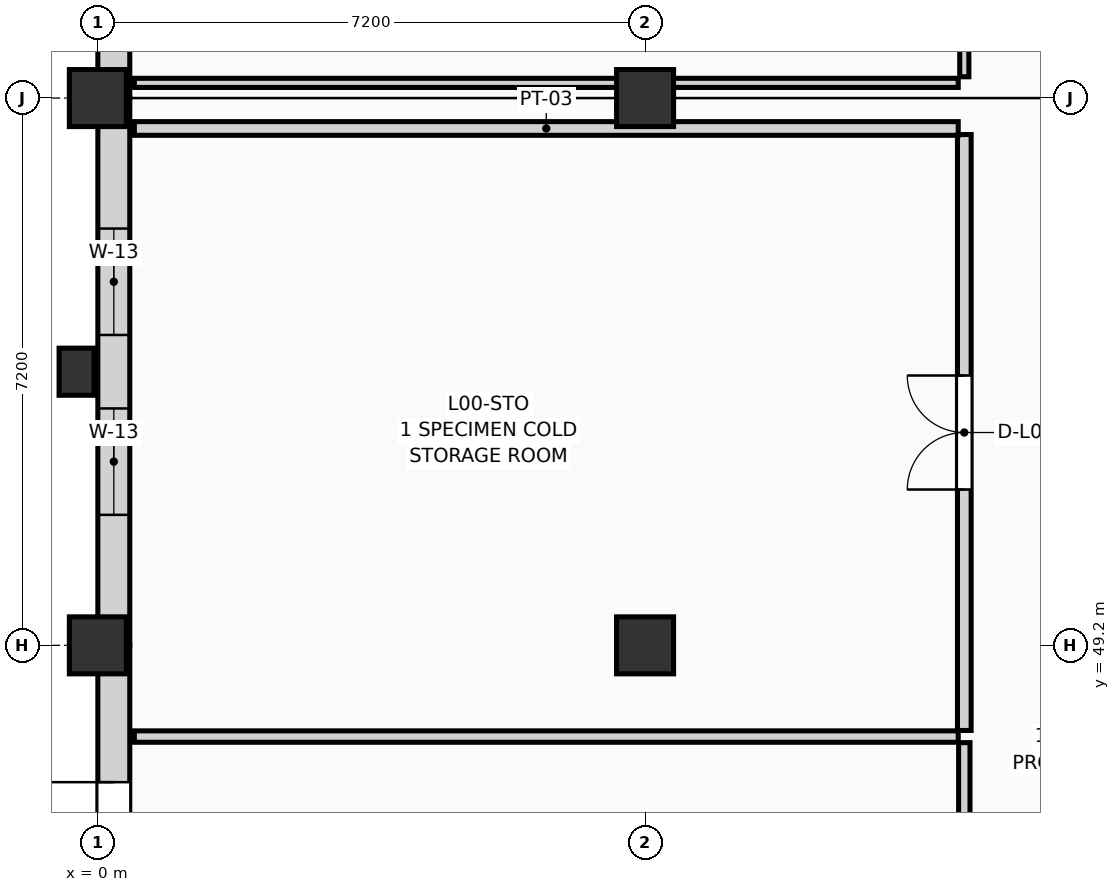
"""IFC4 building model, lengths in metres.
Left out: names, types, materials, properties, quantities, classifications, styles, units other than length and angle.
Written with IfcOpenShell. Run it as: python <this file> out.ifc"""

import sys

from ifc_helpers import new_model, si_unit, direction, frame, frame_2d, origin, origin_2d, place, context, subcontext, project, spatial, rectangle, extrude, element, fill, save


model = new_model("IFC4")
c1 = context("Model", 3, precision=1e-05, world=origin(), true_north=direction((0.0, 1.0)))
c2 = subcontext(c1, "Body", "Model", "MODEL_VIEW")
j1 = project(units=[si_unit("LENGTHUNIT", "METRE"), si_unit("PLANEANGLEUNIT", "RADIAN")], contexts=[c1])
p1 = place(None, origin())
s1 = spatial("IfcSite", under=j1, at=p1, CompositionType="ELEMENT")
p2 = place(p1, origin())
s2 = spatial("IfcBuilding", under=s1, at=p2, CompositionType="ELEMENT")
p3 = place(p2, origin())
s3 = spatial("IfcBuildingStorey", under=s2, at=p3, CompositionType="ELEMENT", Elevation=0.0)
for number, where, z_axis, x_axis in (
    (1, (0.0, 49.2, 0.0), (0.0, 0.0, 1.0), (1.0, 0.0, 0.0)),
    (2, (0.0, 56.4, 0.0), (0.0, 0.0, 1.0), (1.0, 0.0, 0.0)),
    (3, (7.2, 49.2, 0.0), (0.0, 0.0, 1.0), (1.0, 0.0, 0.0)),
    (4, (7.2, 56.4, 0.0), (0.0, 0.0, 1.0), (1.0, 0.0, 0.0)),
):
    element("IfcColumn", number, at=place(p3, frame(where, z_axis=z_axis, x_axis=x_axis)), inside=s3, PredefinedType="COLUMN", context=c2, shape_type="SweptSolid", body=[
        extrude(rectangle(XDim=0.75, YDim=0.75, at=origin_2d()), origin(), (0.0, 0.0, 1.0), 4.5),
    ])
p4 = place(p3, frame((-0.28, 52.8, 0.0), z_axis=(0.0, 0.0, 1.0), x_axis=(1.0, 0.0, 0.0)))
e5 = element("IfcColumn", 5, at=p4, inside=s3, PredefinedType="PILASTER", context=c2, shape_type="SweptSolid", body=[
    extrude(rectangle(XDim=0.46, YDim=0.62, at=origin_2d()), origin(), (0.0, 0.0, 1.0), 4.5),
])
p5 = place(p3, frame((0.21, 43.2, 0.0), z_axis=(0.0, 0.0, 1.0), x_axis=(0.0, 1.0, 0.0)))
e6 = element("IfcWall", 6, at=p5, inside=s3, PredefinedType="SOLIDWALL", context=c2, shape_type="SweptSolid", body=[
    extrude(rectangle(XDim=6.0, YDim=0.42, at=frame_2d((3.0, 0.0))), origin(), (0.0, 0.0, 1.0), 3.62),
])
p6 = place(p5, frame((1.8, 0.0, 0.0)))
e7 = element("IfcOpeningElement", 7, at=p6, cuts=e6, PredefinedType="OPENING", context=c2, shape_type="SweptSolid", body=[
    extrude(rectangle(XDim=2.4, YDim=2.6, at=frame_2d((1.2, 1.3))), frame((0.0, 0.222, 0.0), z_axis=(0.0, -1.0, 0.0), x_axis=(1.0, 0.0, 0.0)), (0.0, 0.0, 1.0), 0.444),
])
p7 = place(p3, frame((0.21, 49.2, 0.0), z_axis=(0.0, 0.0, 1.0), x_axis=(0.0, 1.0, 0.0)))
e8 = element("IfcWall", 8, at=p7, inside=s3, PredefinedType="SOLIDWALL", context=c2, shape_type="SweptSolid", body=[
    extrude(rectangle(XDim=7.2, YDim=0.42, at=frame_2d((3.6, 0.0))), origin(), (0.0, 0.0, 1.0), 3.62),
])
p8 = place(p7, frame((1.717, 0.0, 0.45)))
e9 = element("IfcOpeningElement", 9, at=p8, cuts=e8, PredefinedType="OPENING", context=c2, shape_type="SweptSolid", body=[
    extrude(rectangle(XDim=1.4, YDim=2.55, at=frame_2d((0.7, 1.275))), frame((0.0, 0.222, 0.0), z_axis=(0.0, -1.0, 0.0), x_axis=(1.0, 0.0, 0.0)), (0.0, 0.0, 1.0), 0.444),
])
p9 = place(p7, frame((4.083, 0.0, 0.45)))
e10 = element("IfcOpeningElement", 10, at=p9, cuts=e8, PredefinedType="OPENING", context=c2, shape_type="SweptSolid", body=[
    extrude(rectangle(XDim=1.4, YDim=2.55, at=frame_2d((0.7, 1.275))), frame((0.0, 0.222, 0.0), z_axis=(0.0, -1.0, 0.0), x_axis=(1.0, 0.0, 0.0)), (0.0, 0.0, 1.0), 0.444),
])
p10 = place(p3, frame((0.21, 56.4, 0.0), z_axis=(0.0, 0.0, 1.0), x_axis=(0.0, 1.0, 0.0)))
e11 = element("IfcWall", 11, at=p10, inside=s3, PredefinedType="SOLIDWALL", context=c2, shape_type="SweptSolid", body=[
    extrude(rectangle(XDim=7.2, YDim=0.42, at=frame_2d((3.6, 0.0))), origin(), (0.0, 0.0, 1.0), 3.62),
])
p11 = place(p10, frame((1.783, 0.0, 0.45)))
e12 = element("IfcOpeningElement", 12, at=p11, cuts=e11, PredefinedType="OPENING", context=c2, shape_type="SweptSolid", body=[
    extrude(rectangle(XDim=1.3, YDim=2.5, at=frame_2d((0.65, 1.25))), frame((0.0, 0.222, 0.0), z_axis=(0.0, -1.0, 0.0), x_axis=(1.0, 0.0, 0.0)), (0.0, 0.0, 1.0), 0.444),
])
p12 = place(p10, frame((4.117, 0.0, 0.45)))
e13 = element("IfcOpeningElement", 13, at=p12, cuts=e11, PredefinedType="OPENING", context=c2, shape_type="SweptSolid", body=[
    extrude(rectangle(XDim=1.3, YDim=2.5, at=frame_2d((0.65, 1.25))), frame((0.0, 0.222, 0.0), z_axis=(0.0, -1.0, 0.0), x_axis=(1.0, 0.0, 0.0)), (0.0, 0.0, 1.0), 0.444),
])
p13 = place(p3, frame((11.4, 35.68, 0.0), z_axis=(0.0, 0.0, 1.0), x_axis=(0.0, 1.0, 0.0)))
e14 = element("IfcWall", 14, at=p13, inside=s3, PredefinedType="PARTITIONING", context=c2, shape_type="SweptSolid", body=[
    extrude(rectangle(XDim=12.24, YDim=0.15, at=frame_2d((6.12, 0.0))), origin(), (0.0, 0.0, 1.0), 4.235),
])
p14 = place(p13, frame((5.41, 0.0, 0.0)))
e15 = element("IfcOpeningElement", 15, at=p14, cuts=e14, PredefinedType="OPENING", context=c2, shape_type="SweptSolid", body=[
    extrude(rectangle(XDim=1.42, YDim=2.22, at=frame_2d((0.71, 1.11))), frame((0.0, 0.087, 0.0), z_axis=(0.0, -1.0, 0.0), x_axis=(1.0, 0.0, 0.0)), (0.0, 0.0, 1.0), 0.174),
])
p15 = place(p3, frame((0.48, 48.0, 0.0), z_axis=(0.0, 0.0, 1.0), x_axis=(1.0, 0.0, 0.0)))
e16 = element("IfcWall", 16, at=p15, inside=s3, PredefinedType="PARTITIONING", context=c2, shape_type="SweptSolid", body=[
    extrude(rectangle(XDim=10.84, YDim=0.15, at=frame_2d((5.42, 0.0))), origin(), (0.0, 0.0, 1.0), 4.235),
])
p16 = place(p3, frame((11.4, 48.08, 0.0), z_axis=(0.0, 0.0, 1.0), x_axis=(0.0, 1.0, 0.0)))
e17 = element("IfcWall", 17, at=p16, inside=s3, PredefinedType="PARTITIONING", context=c2, shape_type="SweptSolid", body=[
    extrude(rectangle(XDim=7.84, YDim=0.18, at=frame_2d((3.92, 0.0))), origin(), (0.0, 0.0, 1.0), 4.235),
])
p17 = place(p16, frame((3.17, 0.0, 0.0)))
e18 = element("IfcOpeningElement", 18, at=p17, cuts=e17, PredefinedType="OPENING", context=c2, shape_type="SweptSolid", body=[
    extrude(rectangle(XDim=1.5, YDim=2.25, at=frame_2d((0.75, 1.125))), frame((0.0, 0.102, 0.0), z_axis=(0.0, -1.0, 0.0), x_axis=(1.0, 0.0, 0.0)), (0.0, 0.0, 1.0), 0.204),
])
p18 = place(p3, frame((0.48, 56.0, 0.0), z_axis=(0.0, 0.0, 1.0), x_axis=(1.0, 0.0, 0.0)))
e19 = element("IfcWall", 19, at=p18, inside=s3, PredefinedType="PARTITIONING", context=c2, shape_type="SweptSolid", body=[
    extrude(rectangle(XDim=10.84, YDim=0.18, at=frame_2d((5.42, 0.0))), origin(), (0.0, 0.0, 1.0), 3.485),
])
p19 = place(p3, frame((0.48, 56.6, 0.0), z_axis=(0.0, 0.0, 1.0), x_axis=(1.0, 0.0, 0.0)))
e20 = element("IfcWall", 20, at=p19, inside=s3, PredefinedType="PARTITIONING", context=c2, shape_type="SweptSolid", body=[
    extrude(rectangle(XDim=10.84, YDim=0.12, at=frame_2d((5.42, 0.0))), origin(), (0.0, 0.0, 1.0), 3.485),
])
p20 = place(p3, frame((11.4, 56.68, 0.0), z_axis=(0.0, 0.0, 1.0), x_axis=(0.0, 1.0, 0.0)))
e21 = element("IfcWall", 21, at=p20, inside=s3, PredefinedType="PARTITIONING", context=c2, shape_type="SweptSolid", body=[
    extrude(rectangle(XDim=28.44, YDim=0.12, at=frame_2d((14.22, 0.0))), origin(), (0.0, 0.0, 1.0), 4.235),
])
p21 = place(p20, frame((13.37, 0.0, 0.0)))
e22 = element("IfcOpeningElement", 22, at=p21, cuts=e21, PredefinedType="OPENING", context=c2, shape_type="SweptSolid", body=[
    extrude(rectangle(XDim=1.7, YDim=2.28, at=frame_2d((0.85, 1.14))), frame((0.0, 0.072, 0.0), z_axis=(0.0, -1.0, 0.0), x_axis=(1.0, 0.0, 0.0)), (0.0, 0.0, 1.0), 0.144),
])
p22 = place(p6, origin())
e23 = element("IfcDoor", 23, at=p22, inside=s3, OperationType="DOUBLE_DOOR_SINGLE_SWING", PredefinedType="DOOR", context=c2, shape_type="SweptSolid", body=[
    extrude(rectangle(XDim=2.4, YDim=2.6, at=frame_2d((1.2, 1.3))), frame((0.0, 0.025, 0.0), z_axis=(0.0, -1.0, 0.0), x_axis=(1.0, 0.0, 0.0)), (0.0, 0.0, 1.0), 0.05),
])
fill(e7, e23)
p23 = place(p8, origin())
e24 = element("IfcWindow", 24, at=p23, inside=s3, PartitioningType="SINGLE_PANEL", PredefinedType="WINDOW", context=c2, shape_type="SweptSolid", body=[
    extrude(rectangle(XDim=1.4, YDim=2.55, at=frame_2d((0.7, 1.275))), frame((0.0, 0.03, 0.0), z_axis=(0.0, -1.0, 0.0), x_axis=(1.0, 0.0, 0.0)), (0.0, 0.0, 1.0), 0.06),
])
fill(e9, e24)
p24 = place(p9, origin())
e25 = element("IfcWindow", 25, at=p24, inside=s3, PartitioningType="SINGLE_PANEL", PredefinedType="WINDOW", context=c2, shape_type="SweptSolid", body=[
    extrude(rectangle(XDim=1.4, YDim=2.55, at=frame_2d((0.7, 1.275))), frame((0.0, 0.03, 0.0), z_axis=(0.0, -1.0, 0.0), x_axis=(1.0, 0.0, 0.0)), (0.0, 0.0, 1.0), 0.06),
])
fill(e10, e25)
p25 = place(p17, origin())
e26 = element("IfcDoor", 26, at=p25, inside=s3, OperationType="DOUBLE_DOOR_SINGLE_SWING", PredefinedType="DOOR", context=c2, shape_type="SweptSolid", body=[
    extrude(rectangle(XDim=1.5, YDim=2.25, at=frame_2d((0.75, 1.125))), frame((0.0, 0.025, 0.0), z_axis=(0.0, -1.0, 0.0), x_axis=(1.0, 0.0, 0.0)), (0.0, 0.0, 1.0), 0.05),
])
fill(e18, e26)
save(model, sys.argv[1])
